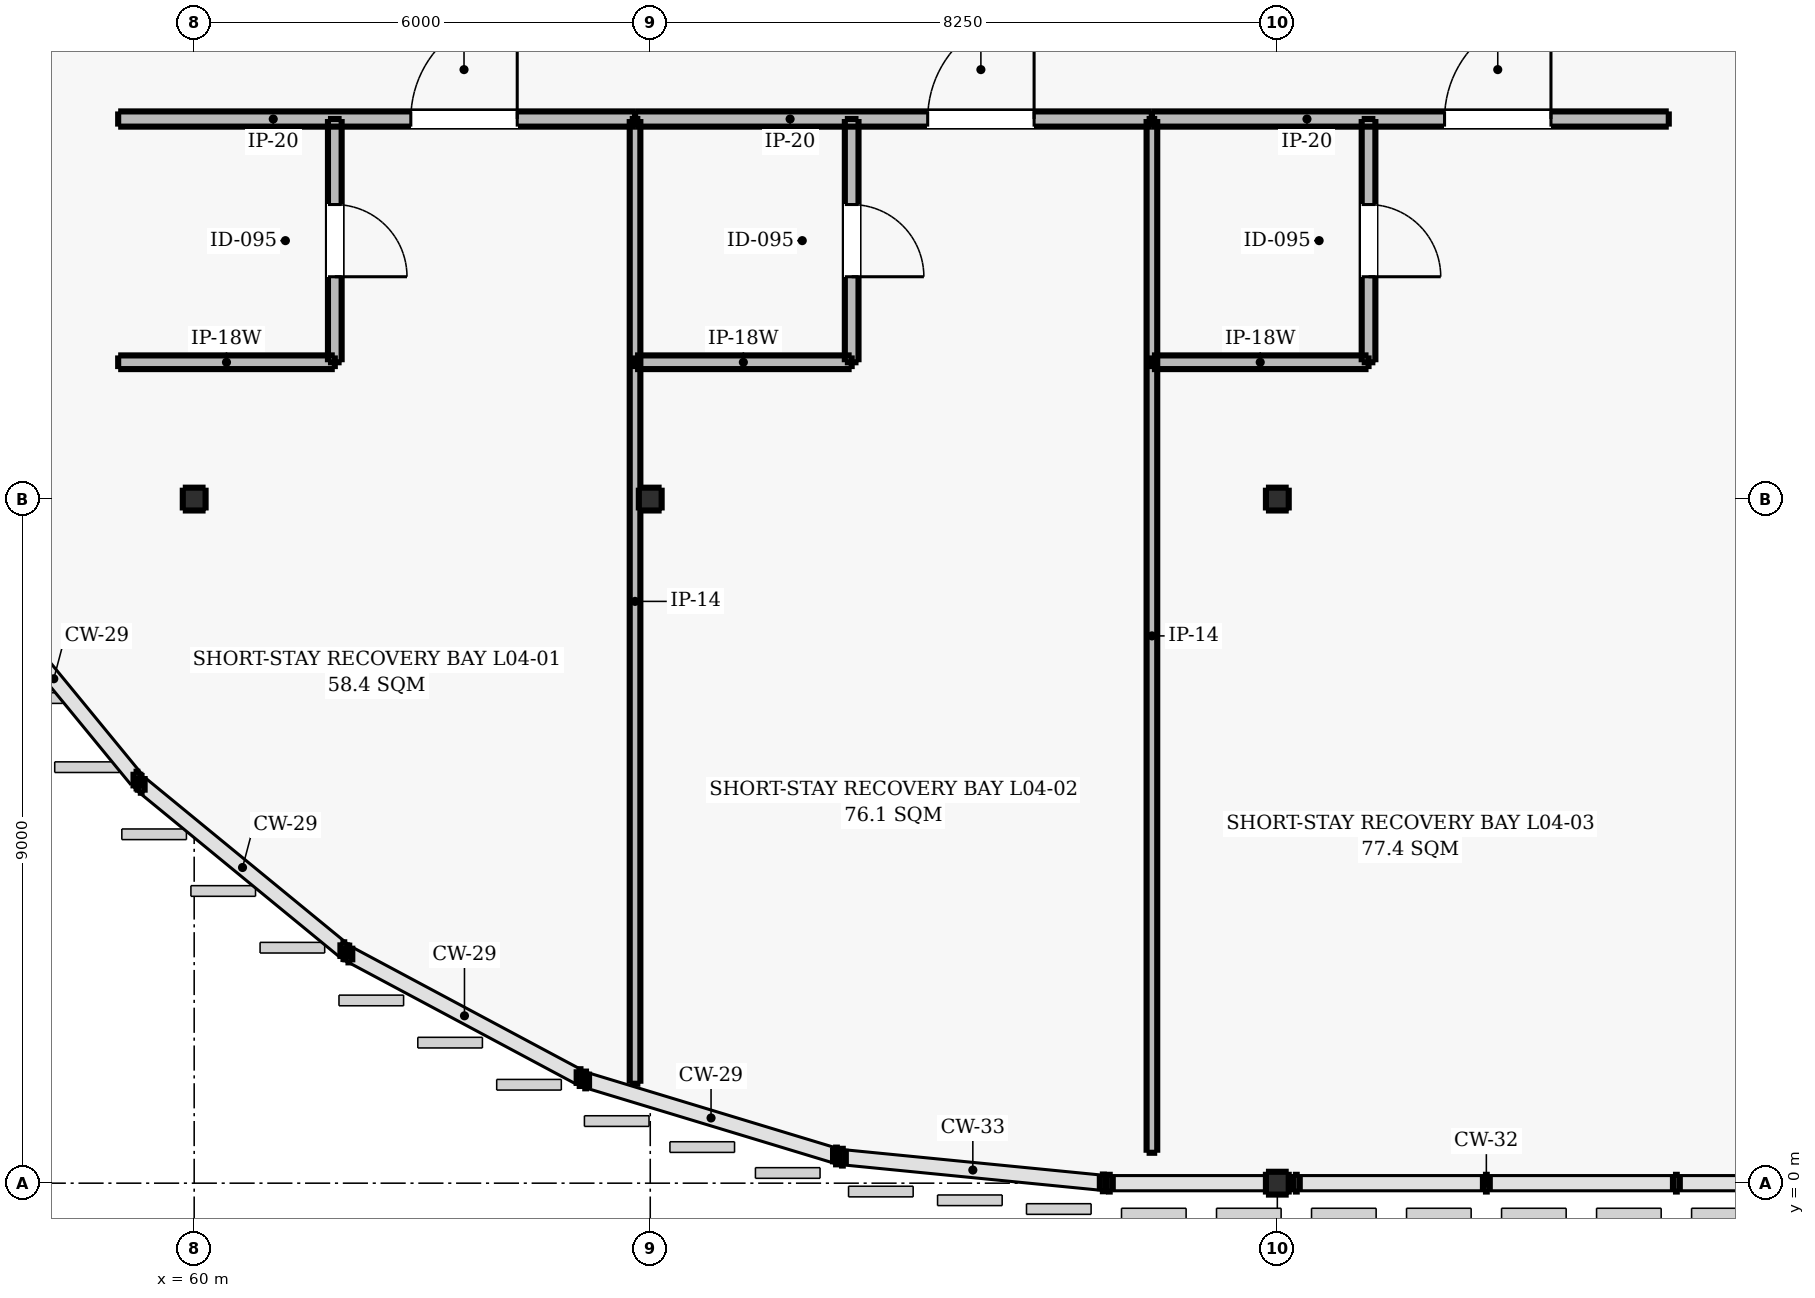
"""IFC4 building model, lengths in metres.
Left out: names, types, materials, properties, quantities, classifications, styles, units other than length and angle.
Written with IfcOpenShell. Run it as: python <this file> out.ifc"""

import sys

from ifc_helpers import new_model, si_unit, direction, frame, frame_2d, origin, origin_2d, place, context, subcontext, project, spatial, rectangle, i_section, extrude, element, fill, save


model = new_model("IFC4")
c1 = context("Model", 3, precision=1e-05, world=origin(), true_north=direction((0.0, 1.0)))
c2 = subcontext(c1, "Body", "Model", "MODEL_VIEW")
j1 = project(units=[si_unit("LENGTHUNIT", "METRE"), si_unit("PLANEANGLEUNIT", "RADIAN")], contexts=[c1])
p1 = place(None, origin())
s1 = spatial("IfcSite", under=j1, at=p1, CompositionType="ELEMENT")
p2 = place(p1, origin())
s2 = spatial("IfcBuilding", under=s1, at=p2, CompositionType="ELEMENT")
p3 = place(p2, frame((0.0, 0.0, 18.0)))
s3 = spatial("IfcBuildingStorey", under=s2, at=p3, CompositionType="ELEMENT", Elevation=18.0)
for number, where, z_axis, x_axis in (
    (1, (60.0, 9.0, 0.0), (0.0, 0.0, 1.0), (1.0, 0.0, 0.0)),
    (2, (66.0, 9.0, 0.0), (0.0, 0.0, 1.0), (1.0, 0.0, 0.0)),
    (3, (74.25, 0.0, 0.0), (0.0, 0.0, 1.0), (1.0, 0.0, 0.0)),
    (4, (74.25, 9.0, 0.0), (0.0, 0.0, 1.0), (1.0, 0.0, 0.0)),
):
    element("IfcColumn", number, at=place(p3, frame(where, z_axis=z_axis, x_axis=x_axis)), inside=s3, PredefinedType="COLUMN", context=c2, shape_type="SweptSolid", body=[
        extrude(i_section(OverallWidth=0.3, OverallDepth=0.3, WebThickness=0.011, FlangeThickness=0.019, FilletRadius=0.027, at=origin_2d()), origin(), (0.0, 0.0, 1.0), 4.2),
    ])
p4 = place(p3, frame((59.0, 14.0, 0.0), z_axis=(0.0, 0.0, 1.0), x_axis=(1.0, 0.0, 0.0)))
e5 = element("IfcWall", 5, at=p4, inside=s3, PredefinedType="PARTITIONING", context=c2, shape_type="SweptSolid", body=[
    extrude(rectangle(XDim=6.8, YDim=0.2, at=frame_2d((3.4, 0.0))), origin(), (0.0, 0.0, 1.0), 3.92),
])
p5 = place(p4, frame((3.85, 0.0, 0.0)))
e6 = element("IfcOpeningElement", 6, at=p5, cuts=e5, PredefinedType="OPENING", context=c2, shape_type="SweptSolid", body=[
    extrude(rectangle(XDim=1.4, YDim=2.2, at=frame_2d((0.7, 1.1))), frame((0.0, 0.11, 0.0), z_axis=(0.0, -1.0, 0.0), x_axis=(1.0, 0.0, 0.0)), (0.0, 0.0, 1.0), 0.22),
])
p6 = place(p3, frame((61.85, 10.8, 0.0), z_axis=(0.0, 0.0, 1.0), x_axis=(0.0, 1.0, 0.0)))
e7 = element("IfcWall", 7, at=p6, inside=s3, PredefinedType="PARTITIONING", context=c2, shape_type="SweptSolid", body=[
    extrude(rectangle(XDim=3.2, YDim=0.18, at=frame_2d((1.6, 0.0))), origin(), (0.0, 0.0, 1.0), 3.92),
])
p7 = place(p6, frame((1.125, 0.0, 0.0)))
e8 = element("IfcOpeningElement", 8, at=p7, cuts=e7, PredefinedType="OPENING", context=c2, shape_type="SweptSolid", body=[
    extrude(rectangle(XDim=0.95, YDim=2.1, at=frame_2d((0.475, 1.05))), frame((0.0, 0.1, 0.0), z_axis=(0.0, -1.0, 0.0), x_axis=(1.0, 0.0, 0.0)), (0.0, 0.0, 1.0), 0.2),
])
p8 = place(p3, frame((59.0, 10.8, 0.0), z_axis=(0.0, 0.0, 1.0), x_axis=(1.0, 0.0, 0.0)))
e9 = element("IfcWall", 9, at=p8, inside=s3, PredefinedType="PARTITIONING", context=c2, shape_type="SweptSolid", body=[
    extrude(rectangle(XDim=2.85, YDim=0.18, at=frame_2d((1.425, 0.0))), origin(), (0.0, 0.0, 1.0), 3.92),
])
p9 = place(p3, frame((65.8, 1.308, 0.0), z_axis=(0.0, 0.0, 1.0), x_axis=(0.0, 1.0, 0.0)))
e10 = element("IfcWall", 10, at=p9, inside=s3, PredefinedType="PARTITIONING", context=c2, shape_type="SweptSolid", body=[
    extrude(rectangle(XDim=12.692, YDim=0.14, at=frame_2d((6.346, 0.0))), origin(), (0.0, 0.0, 1.0), 3.438),
])
p10 = place(p3, frame((65.8, 14.0, 0.0), z_axis=(0.0, 0.0, 1.0), x_axis=(1.0, 0.0, 0.0)))
e11 = element("IfcWall", 11, at=p10, inside=s3, PredefinedType="PARTITIONING", context=c2, shape_type="SweptSolid", body=[
    extrude(rectangle(XDim=6.8, YDim=0.2, at=frame_2d((3.4, 0.0))), origin(), (0.0, 0.0, 1.0), 3.92),
])
p11 = place(p10, frame((3.85, 0.0, 0.0)))
e12 = element("IfcOpeningElement", 12, at=p11, cuts=e11, PredefinedType="OPENING", context=c2, shape_type="SweptSolid", body=[
    extrude(rectangle(XDim=1.4, YDim=2.2, at=frame_2d((0.7, 1.1))), frame((0.0, 0.11, 0.0), z_axis=(0.0, -1.0, 0.0), x_axis=(1.0, 0.0, 0.0)), (0.0, 0.0, 1.0), 0.22),
])
p12 = place(p3, frame((68.65, 10.8, 0.0), z_axis=(0.0, 0.0, 1.0), x_axis=(0.0, 1.0, 0.0)))
e13 = element("IfcWall", 13, at=p12, inside=s3, PredefinedType="PARTITIONING", context=c2, shape_type="SweptSolid", body=[
    extrude(rectangle(XDim=3.2, YDim=0.18, at=frame_2d((1.6, 0.0))), origin(), (0.0, 0.0, 1.0), 3.61),
])
p13 = place(p12, frame((1.125, 0.0, 0.0)))
e14 = element("IfcOpeningElement", 14, at=p13, cuts=e13, PredefinedType="OPENING", context=c2, shape_type="SweptSolid", body=[
    extrude(rectangle(XDim=0.95, YDim=2.1, at=frame_2d((0.475, 1.05))), frame((0.0, 0.1, 0.0), z_axis=(0.0, -1.0, 0.0), x_axis=(1.0, 0.0, 0.0)), (0.0, 0.0, 1.0), 0.2),
])
p14 = place(p3, frame((65.8, 10.8, 0.0), z_axis=(0.0, 0.0, 1.0), x_axis=(1.0, 0.0, 0.0)))
e15 = element("IfcWall", 15, at=p14, inside=s3, PredefinedType="PARTITIONING", context=c2, shape_type="SweptSolid", body=[
    extrude(rectangle(XDim=2.85, YDim=0.18, at=frame_2d((1.425, 0.0))), origin(), (0.0, 0.0, 1.0), 3.92),
])
p15 = place(p3, frame((72.6, 0.4, 0.0), z_axis=(0.0, 0.0, 1.0), x_axis=(0.0, 1.0, 0.0)))
e16 = element("IfcWall", 16, at=p15, inside=s3, PredefinedType="PARTITIONING", context=c2, shape_type="SweptSolid", body=[
    extrude(rectangle(XDim=13.6, YDim=0.14, at=frame_2d((6.8, 0.0))), origin(), (0.0, 0.0, 1.0), 3.92),
])
p16 = place(p3, frame((72.6, 14.0, 0.0), z_axis=(0.0, 0.0, 1.0), x_axis=(1.0, 0.0, 0.0)))
e17 = element("IfcWall", 17, at=p16, inside=s3, PredefinedType="PARTITIONING", context=c2, shape_type="SweptSolid", body=[
    extrude(rectangle(XDim=6.8, YDim=0.2, at=frame_2d((3.4, 0.0))), origin(), (0.0, 0.0, 1.0), 3.92),
])
p17 = place(p16, frame((3.85, 0.0, 0.0)))
e18 = element("IfcOpeningElement", 18, at=p17, cuts=e17, PredefinedType="OPENING", context=c2, shape_type="SweptSolid", body=[
    extrude(rectangle(XDim=1.4, YDim=2.2, at=frame_2d((0.7, 1.1))), frame((0.0, 0.11, 0.0), z_axis=(0.0, -1.0, 0.0), x_axis=(1.0, 0.0, 0.0)), (0.0, 0.0, 1.0), 0.22),
])
p18 = place(p3, frame((75.45, 10.8, 0.0), z_axis=(0.0, 0.0, 1.0), x_axis=(0.0, 1.0, 0.0)))
e19 = element("IfcWall", 19, at=p18, inside=s3, PredefinedType="PARTITIONING", context=c2, shape_type="SweptSolid", body=[
    extrude(rectangle(XDim=3.2, YDim=0.18, at=frame_2d((1.6, 0.0))), origin(), (0.0, 0.0, 1.0), 3.92),
])
p19 = place(p18, frame((1.125, 0.0, 0.0)))
e20 = element("IfcOpeningElement", 20, at=p19, cuts=e19, PredefinedType="OPENING", context=c2, shape_type="SweptSolid", body=[
    extrude(rectangle(XDim=0.95, YDim=2.1, at=frame_2d((0.475, 1.05))), frame((0.0, 0.1, 0.0), z_axis=(0.0, -1.0, 0.0), x_axis=(1.0, 0.0, 0.0)), (0.0, 0.0, 1.0), 0.2),
])
p20 = place(p3, frame((72.6, 10.8, 0.0), z_axis=(0.0, 0.0, 1.0), x_axis=(1.0, 0.0, 0.0)))
e21 = element("IfcWall", 21, at=p20, inside=s3, PredefinedType="PARTITIONING", context=c2, shape_type="SweptSolid", body=[
    extrude(rectangle(XDim=2.85, YDim=0.18, at=frame_2d((1.425, 0.0))), origin(), (0.0, 0.0, 1.0), 3.92),
])
p21 = place(p5, origin())
e22 = element("IfcDoor", 22, at=p21, inside=s3, OperationType="SINGLE_SWING_RIGHT", PredefinedType="DOOR", context=c2, shape_type="SweptSolid", body=[
    extrude(rectangle(XDim=1.4, YDim=2.2, at=frame_2d((0.7, 1.1))), frame((0.0, 0.025, 0.0), z_axis=(0.0, -1.0, 0.0), x_axis=(1.0, 0.0, 0.0)), (0.0, 0.0, 1.0), 0.05),
])
fill(e6, e22)
p22 = place(p7, frame((0.95, 0.0, 0.0), z_axis=(0.0, 0.0, 1.0), x_axis=(-1.0, 0.0, 0.0)))
e23 = element("IfcDoor", 23, at=p22, inside=s3, OperationType="SINGLE_SWING_LEFT", PredefinedType="DOOR", context=c2, shape_type="SweptSolid", body=[
    extrude(rectangle(XDim=0.95, YDim=2.1, at=frame_2d((0.475, 1.05))), frame((0.0, 0.025, 0.0), z_axis=(0.0, -1.0, 0.0), x_axis=(1.0, 0.0, 0.0)), (0.0, 0.0, 1.0), 0.05),
])
fill(e8, e23)
p23 = place(p11, origin())
e24 = element("IfcDoor", 24, at=p23, inside=s3, OperationType="SINGLE_SWING_RIGHT", PredefinedType="DOOR", context=c2, shape_type="SweptSolid", body=[
    extrude(rectangle(XDim=1.4, YDim=2.2, at=frame_2d((0.7, 1.1))), frame((0.0, 0.025, 0.0), z_axis=(0.0, -1.0, 0.0), x_axis=(1.0, 0.0, 0.0)), (0.0, 0.0, 1.0), 0.05),
])
fill(e12, e24)
p24 = place(p13, frame((0.95, 0.0, 0.0), z_axis=(0.0, 0.0, 1.0), x_axis=(-1.0, 0.0, 0.0)))
e25 = element("IfcDoor", 25, at=p24, inside=s3, OperationType="SINGLE_SWING_LEFT", PredefinedType="DOOR", context=c2, shape_type="SweptSolid", body=[
    extrude(rectangle(XDim=0.95, YDim=2.1, at=frame_2d((0.475, 1.05))), frame((0.0, 0.025, 0.0), z_axis=(0.0, -1.0, 0.0), x_axis=(1.0, 0.0, 0.0)), (0.0, 0.0, 1.0), 0.05),
])
fill(e14, e25)
p25 = place(p17, origin())
e26 = element("IfcDoor", 26, at=p25, inside=s3, OperationType="SINGLE_SWING_RIGHT", PredefinedType="DOOR", context=c2, shape_type="SweptSolid", body=[
    extrude(rectangle(XDim=1.4, YDim=2.2, at=frame_2d((0.7, 1.1))), frame((0.0, 0.025, 0.0), z_axis=(0.0, -1.0, 0.0), x_axis=(1.0, 0.0, 0.0)), (0.0, 0.0, 1.0), 0.05),
])
fill(e18, e26)
p26 = place(p19, frame((0.95, 0.0, 0.0), z_axis=(0.0, 0.0, 1.0), x_axis=(-1.0, 0.0, 0.0)))
e27 = element("IfcDoor", 27, at=p26, inside=s3, OperationType="SINGLE_SWING_LEFT", PredefinedType="DOOR", context=c2, shape_type="SweptSolid", body=[
    extrude(rectangle(XDim=0.95, YDim=2.1, at=frame_2d((0.475, 1.05))), frame((0.0, 0.025, 0.0), z_axis=(0.0, -1.0, 0.0), x_axis=(1.0, 0.0, 0.0)), (0.0, 0.0, 1.0), 0.05),
])
fill(e20, e27)
save(model, sys.argv[1])
